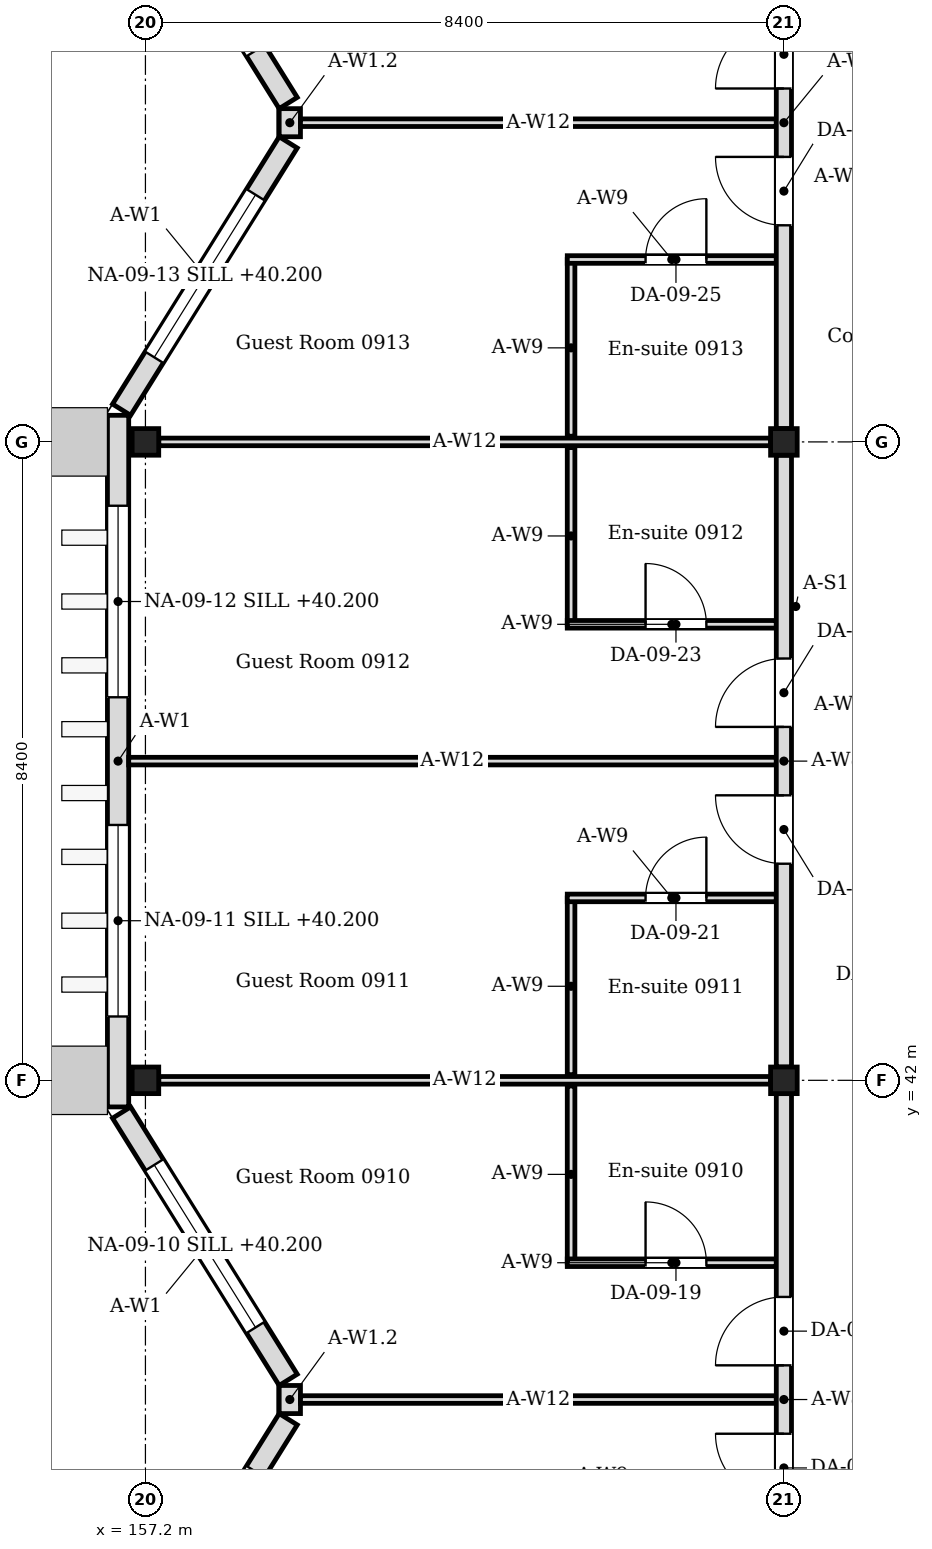
"""IFC4 building model, lengths in metres.
Left out: names, types, materials, properties, quantities, classifications, styles, units other than length and angle.
Written with IfcOpenShell. Run it as: python <this file> out.ifc"""

import sys

from ifc_helpers import new_model, si_unit, direction, frame, frame_2d, origin, origin_2d, place, context, subcontext, project, spatial, rectangle, i_section, extrude, element, fill, save


model = new_model("IFC4")
c1 = context("Model", 3, precision=1e-05, world=origin(), true_north=direction((0.0, 1.0)))
c2 = subcontext(c1, "Body", "Model", "MODEL_VIEW")
j1 = project(units=[si_unit("LENGTHUNIT", "METRE"), si_unit("PLANEANGLEUNIT", "RADIAN")], contexts=[c1])
p1 = place(None, origin())
s1 = spatial("IfcSite", under=j1, at=p1, CompositionType="ELEMENT")
p2 = place(p1, origin())
s2 = spatial("IfcBuilding", under=s1, at=p2, CompositionType="ELEMENT")
p3 = place(p2, frame((0.0, 0.0, 39.6)))
s3 = spatial("IfcBuildingStorey", under=s2, at=p3, CompositionType="ELEMENT", Elevation=39.6)
for number, where, z_axis, x_axis in (
    (1, (157.2, 42.0, 0.0), (0.0, 0.0, 1.0), (1.0, 0.0, 0.0)),
    (2, (157.2, 50.4, 0.0), (0.0, 0.0, 1.0), (1.0, 0.0, 0.0)),
    (3, (165.6, 42.0, 0.0), (0.0, 0.0, 1.0), (1.0, 0.0, 0.0)),
    (4, (165.6, 50.4, 0.0), (0.0, 0.0, 1.0), (1.0, 0.0, 0.0)),
):
    element("IfcColumn", number, at=place(p3, frame(where, z_axis=z_axis, x_axis=x_axis)), inside=s3, PredefinedType="COLUMN", context=c2, shape_type="SweptSolid", body=[
        extrude(i_section(OverallWidth=0.35, OverallDepth=0.35, WebThickness=0.012, FlangeThickness=0.019, FilletRadius=0.013, at=origin_2d()), origin(), (0.0, 0.0, 1.0), 4.2),
    ])
p4 = place(p3, frame((156.886, 34.024, 0.0), z_axis=(0.0, 0.0, 1.0), x_axis=(0.529018946142, 0.848610013271, 0.0)))
e5 = element("IfcWall", 5, at=p4, inside=s3, PredefinedType="SOLIDWALL", context=c2, shape_type="SweptSolid", body=[
    extrude(rectangle(XDim=4.144, YDim=0.28, at=frame_2d((2.072, 0.0))), origin(), (0.0, 0.0, 1.0), 4.05),
])
p5 = place(p4, frame((0.812, 0.0, 0.6)))
e6 = element("IfcOpeningElement", 6, at=p5, cuts=e5, PredefinedType="OPENING", context=c2, shape_type="SweptSolid", body=[
    extrude(rectangle(XDim=2.52, YDim=2.4, at=frame_2d((1.26, 1.2))), frame((0.0, 0.15, 0.0), z_axis=(0.0, -1.0, 0.0), x_axis=(1.0, 0.0, 0.0)), (0.0, 0.0, 1.0), 0.3),
])
p6 = place(p3, frame((159.079, 38.059, 0.0), z_axis=(0.0, 0.0, 1.0), x_axis=(-0.529018946142, 0.848610013271, 0.0)))
e7 = element("IfcWall", 7, at=p6, inside=s3, PredefinedType="SOLIDWALL", context=c2, shape_type="SweptSolid", body=[
    extrude(rectangle(XDim=4.144, YDim=0.28, at=frame_2d((2.072, 0.0))), origin(), (0.0, 0.0, 1.0), 4.05),
])
p7 = place(p6, frame((0.812, 0.0, 0.6)))
e8 = element("IfcOpeningElement", 8, at=p7, cuts=e7, PredefinedType="OPENING", context=c2, shape_type="SweptSolid", body=[
    extrude(rectangle(XDim=2.52, YDim=2.4, at=frame_2d((1.26, 1.2))), frame((0.0, 0.15, 0.0), z_axis=(0.0, -1.0, 0.0), x_axis=(1.0, 0.0, 0.0)), (0.0, 0.0, 1.0), 0.3),
])
p8 = place(p3, frame((159.1, 37.615, 0.0), z_axis=(0.0, 0.0, 1.0), x_axis=(0.0, 1.0, 0.0)))
e9 = element("IfcWall", 9, at=p8, inside=s3, PredefinedType="SOLIDWALL", context=c2, shape_type="SweptSolid", body=[
    extrude(rectangle(XDim=0.37, YDim=0.28, at=frame_2d((0.185, 0.0))), origin(), (0.0, 0.0, 1.0), 3.604),
])
p9 = place(p3, frame((156.84, 41.65, 0.0), z_axis=(0.0, 0.0, 1.0), x_axis=(0.0, 1.0, 0.0)))
e10 = element("IfcWall", 10, at=p9, inside=s3, PredefinedType="SOLIDWALL", context=c2, shape_type="SweptSolid", body=[
    extrude(rectangle(XDim=9.1, YDim=0.28, at=frame_2d((4.55, 0.0))), origin(), (0.0, 0.0, 1.0), 4.05),
])
p10 = place(p9, frame((1.19, 0.0, 0.6)))
e11 = element("IfcOpeningElement", 11, at=p10, cuts=e10, PredefinedType="OPENING", context=c2, shape_type="SweptSolid", body=[
    extrude(rectangle(XDim=2.52, YDim=2.4, at=frame_2d((1.26, 1.2))), frame((0.0, 0.15, 0.0), z_axis=(0.0, -1.0, 0.0), x_axis=(1.0, 0.0, 0.0)), (0.0, 0.0, 1.0), 0.3),
])
p11 = place(p9, frame((5.39, 0.0, 0.6)))
e12 = element("IfcOpeningElement", 12, at=p11, cuts=e10, PredefinedType="OPENING", context=c2, shape_type="SweptSolid", body=[
    extrude(rectangle(XDim=2.52, YDim=2.4, at=frame_2d((1.26, 1.2))), frame((0.0, 0.15, 0.0), z_axis=(0.0, -1.0, 0.0), x_axis=(1.0, 0.0, 0.0)), (0.0, 0.0, 1.0), 0.3),
])
p12 = place(p3, frame((156.886, 50.824, 0.0), z_axis=(0.0, 0.0, 1.0), x_axis=(0.529018946142, 0.848610013271, 0.0)))
e13 = element("IfcWall", 13, at=p12, inside=s3, PredefinedType="SOLIDWALL", context=c2, shape_type="SweptSolid", body=[
    extrude(rectangle(XDim=4.144, YDim=0.28, at=frame_2d((2.072, 0.0))), origin(), (0.0, 0.0, 1.0), 4.05),
])
p13 = place(p12, frame((0.812, 0.0, 0.6)))
e14 = element("IfcOpeningElement", 14, at=p13, cuts=e13, PredefinedType="OPENING", context=c2, shape_type="SweptSolid", body=[
    extrude(rectangle(XDim=2.52, YDim=2.4, at=frame_2d((1.26, 1.2))), frame((0.0, 0.15, 0.0), z_axis=(0.0, -1.0, 0.0), x_axis=(1.0, 0.0, 0.0)), (0.0, 0.0, 1.0), 0.3),
])
p14 = place(p3, frame((159.079, 54.859, 0.0), z_axis=(0.0, 0.0, 1.0), x_axis=(-0.528992500338, 0.848626498871, 0.0)))
e15 = element("IfcWall", 15, at=p14, inside=s3, PredefinedType="SOLIDWALL", context=c2, shape_type="SweptSolid", body=[
    extrude(rectangle(XDim=4.145, YDim=0.28, at=frame_2d((2.072, 0.0))), origin(), (0.0, 0.0, 1.0), 4.05),
])
p15 = place(p14, frame((0.812, 0.0, 0.6)))
e16 = element("IfcOpeningElement", 16, at=p15, cuts=e15, PredefinedType="OPENING", context=c2, shape_type="SweptSolid", body=[
    extrude(rectangle(XDim=2.52, YDim=2.4, at=frame_2d((1.26, 1.2))), frame((0.0, 0.15, 0.0), z_axis=(0.0, -1.0, 0.0), x_axis=(1.0, 0.0, 0.0)), (0.0, 0.0, 1.0), 0.3),
])
p16 = place(p3, frame((159.1, 54.415, 0.0), z_axis=(0.0, 0.0, 1.0), x_axis=(0.0, 1.0, 0.0)))
e17 = element("IfcWall", 17, at=p16, inside=s3, PredefinedType="SOLIDWALL", context=c2, shape_type="SweptSolid", body=[
    extrude(rectangle(XDim=0.37, YDim=0.28, at=frame_2d((0.185, 0.0))), origin(), (0.0, 0.0, 1.0), 3.604),
])
p17 = place(p3, frame((162.8, 39.6, 0.0), z_axis=(0.0, 0.0, 1.0), x_axis=(0.0, 1.0, 0.0)))
e18 = element("IfcWall", 18, at=p17, inside=s3, PredefinedType="PARTITIONING", context=c2, shape_type="SweptSolid", body=[
    extrude(rectangle(XDim=2.325, YDim=0.1, at=frame_2d((1.163, 0.0))), origin(), (0.0, 0.0, 1.0), 4.05),
])
p18 = place(p3, frame((162.75, 39.6, 0.0), z_axis=(0.0, 0.0, 1.0), x_axis=(1.0, 0.0, 0.0)))
e19 = element("IfcWall", 19, at=p18, inside=s3, PredefinedType="PARTITIONING", context=c2, shape_type="SweptSolid", body=[
    extrude(rectangle(XDim=2.75, YDim=0.1, at=frame_2d((1.375, 0.0))), origin(), (0.0, 0.0, 1.0), 4.05),
])
p19 = place(p18, frame((1.03, 0.0, 0.0)))
e20 = element("IfcOpeningElement", 20, at=p19, cuts=e19, PredefinedType="OPENING", context=c2, shape_type="SweptSolid", body=[
    extrude(rectangle(XDim=0.8, YDim=2.1, at=frame_2d((0.4, 1.05))), frame((0.0, 0.06, 0.0), z_axis=(0.0, -1.0, 0.0), x_axis=(1.0, 0.0, 0.0)), (0.0, 0.0, 1.0), 0.12),
])
p20 = place(p3, frame((162.8, 42.075, 0.0), z_axis=(0.0, 0.0, 1.0), x_axis=(0.0, 1.0, 0.0)))
e21 = element("IfcWall", 21, at=p20, inside=s3, PredefinedType="PARTITIONING", context=c2, shape_type="SweptSolid", body=[
    extrude(rectangle(XDim=2.325, YDim=0.1, at=frame_2d((1.163, 0.0))), origin(), (0.0, 0.0, 1.0), 4.05),
])
p21 = place(p3, frame((162.75, 44.4, 0.0), z_axis=(0.0, 0.0, 1.0), x_axis=(1.0, 0.0, 0.0)))
e22 = element("IfcWall", 22, at=p21, inside=s3, PredefinedType="PARTITIONING", context=c2, shape_type="SweptSolid", body=[
    extrude(rectangle(XDim=2.75, YDim=0.1, at=frame_2d((1.375, 0.0))), origin(), (0.0, 0.0, 1.0), 4.05),
])
p22 = place(p21, frame((1.03, 0.0, 0.0)))
e23 = element("IfcOpeningElement", 23, at=p22, cuts=e22, PredefinedType="OPENING", context=c2, shape_type="SweptSolid", body=[
    extrude(rectangle(XDim=0.8, YDim=2.1, at=frame_2d((0.4, 1.05))), frame((0.0, 0.06, 0.0), z_axis=(0.0, -1.0, 0.0), x_axis=(1.0, 0.0, 0.0)), (0.0, 0.0, 1.0), 0.12),
])
p23 = place(p3, frame((162.8, 48.0, 0.0), z_axis=(0.0, 0.0, 1.0), x_axis=(0.0, 1.0, 0.0)))
e24 = element("IfcWall", 24, at=p23, inside=s3, PredefinedType="PARTITIONING", context=c2, shape_type="SweptSolid", body=[
    extrude(rectangle(XDim=2.325, YDim=0.1, at=frame_2d((1.163, 0.0))), origin(), (0.0, 0.0, 1.0), 4.05),
])
p24 = place(p3, frame((162.75, 48.0, 0.0), z_axis=(0.0, 0.0, 1.0), x_axis=(1.0, 0.0, 0.0)))
e25 = element("IfcWall", 25, at=p24, inside=s3, PredefinedType="PARTITIONING", context=c2, shape_type="SweptSolid", body=[
    extrude(rectangle(XDim=2.75, YDim=0.1, at=frame_2d((1.375, 0.0))), origin(), (0.0, 0.0, 1.0), 4.05),
])
p25 = place(p24, frame((1.03, 0.0, 0.0)))
e26 = element("IfcOpeningElement", 26, at=p25, cuts=e25, PredefinedType="OPENING", context=c2, shape_type="SweptSolid", body=[
    extrude(rectangle(XDim=0.8, YDim=2.1, at=frame_2d((0.4, 1.05))), frame((0.0, 0.06, 0.0), z_axis=(0.0, -1.0, 0.0), x_axis=(1.0, 0.0, 0.0)), (0.0, 0.0, 1.0), 0.12),
])
p26 = place(p3, frame((162.8, 50.475, 0.0), z_axis=(0.0, 0.0, 1.0), x_axis=(0.0, 1.0, 0.0)))
e27 = element("IfcWall", 27, at=p26, inside=s3, PredefinedType="PARTITIONING", context=c2, shape_type="SweptSolid", body=[
    extrude(rectangle(XDim=2.325, YDim=0.1, at=frame_2d((1.163, 0.0))), origin(), (0.0, 0.0, 1.0), 4.05),
])
p27 = place(p3, frame((162.75, 52.8, 0.0), z_axis=(0.0, 0.0, 1.0), x_axis=(1.0, 0.0, 0.0)))
e28 = element("IfcWall", 28, at=p27, inside=s3, PredefinedType="PARTITIONING", context=c2, shape_type="SweptSolid", body=[
    extrude(rectangle(XDim=2.75, YDim=0.1, at=frame_2d((1.375, 0.0))), origin(), (0.0, 0.0, 1.0), 4.05),
])
p28 = place(p27, frame((1.03, 0.0, 0.0)))
e29 = element("IfcOpeningElement", 29, at=p28, cuts=e28, PredefinedType="OPENING", context=c2, shape_type="SweptSolid", body=[
    extrude(rectangle(XDim=0.8, YDim=2.1, at=frame_2d((0.4, 1.05))), frame((0.0, 0.06, 0.0), z_axis=(0.0, -1.0, 0.0), x_axis=(1.0, 0.0, 0.0)), (0.0, 0.0, 1.0), 0.12),
])
for number, where, z_axis, x_axis in (
    (30, (157.375, 42.0, 0.0), (0.0, 0.0, 1.0), (1.0, 0.0, 0.0)),
    (31, (157.375, 50.4, 0.0), (0.0, 0.0, 1.0), (1.0, 0.0, 0.0)),
):
    element("IfcWall", number, at=place(p3, frame(where, z_axis=z_axis, x_axis=x_axis)), inside=s3, PredefinedType="PARTITIONING", context=c2, shape_type="SweptSolid", body=[
        extrude(rectangle(XDim=8.05, YDim=0.1, at=frame_2d((4.025, 0.0))), origin(), (0.0, 0.0, 1.0), 3.604),
    ])
p29 = place(p3, frame((159.24, 37.8, 0.0), z_axis=(0.0, 0.0, 1.0), x_axis=(1.0, 0.0, 0.0)))
e32 = element("IfcWall", 32, at=p29, inside=s3, PredefinedType="PARTITIONING", context=c2, shape_type="SweptSolid", body=[
    extrude(rectangle(XDim=6.26, YDim=0.1, at=frame_2d((3.13, 0.0))), origin(), (0.0, 0.0, 1.0), 3.604),
])
p30 = place(p3, frame((156.98, 46.2, 0.0), z_axis=(0.0, 0.0, 1.0), x_axis=(1.0, 0.0, 0.0)))
e33 = element("IfcWall", 33, at=p30, inside=s3, PredefinedType="PARTITIONING", context=c2, shape_type="SweptSolid", body=[
    extrude(rectangle(XDim=8.52, YDim=0.1, at=frame_2d((4.26, 0.0))), origin(), (0.0, 0.0, 1.0), 3.604),
])
p31 = place(p3, frame((159.24, 54.6, 0.0), z_axis=(0.0, 0.0, 1.0), x_axis=(1.0, 0.0, 0.0)))
e34 = element("IfcWall", 34, at=p31, inside=s3, PredefinedType="PARTITIONING", context=c2, shape_type="SweptSolid", body=[
    extrude(rectangle(XDim=6.26, YDim=0.1, at=frame_2d((3.13, 0.0))), origin(), (0.0, 0.0, 1.0), 3.604),
])
p32 = place(p3, frame((165.6, 33.775, 0.0), z_axis=(0.0, 0.0, 1.0), x_axis=(0.0, 1.0, 0.0)))
e35 = element("IfcWall", 35, at=p32, inside=s3, PredefinedType="PARTITIONING", context=c2, shape_type="SweptSolid", body=[
    extrude(rectangle(XDim=8.05, YDim=0.2, at=frame_2d((4.025, 0.0))), origin(), (0.0, 0.0, 1.0), 3.45),
])
p33 = place(p32, frame((2.675, 0.0, 0.0)))
e36 = element("IfcOpeningElement", 36, at=p33, cuts=e35, PredefinedType="OPENING", context=c2, shape_type="SweptSolid", body=[
    extrude(rectangle(XDim=0.9, YDim=2.1, at=frame_2d((0.45, 1.05))), frame((0.0, 0.11, 0.0), z_axis=(0.0, -1.0, 0.0), x_axis=(1.0, 0.0, 0.0)), (0.0, 0.0, 1.0), 0.22),
])
p34 = place(p32, frame((4.475, 0.0, 0.0)))
e37 = element("IfcOpeningElement", 37, at=p34, cuts=e35, PredefinedType="OPENING", context=c2, shape_type="SweptSolid", body=[
    extrude(rectangle(XDim=0.9, YDim=2.1, at=frame_2d((0.45, 1.05))), frame((0.0, 0.11, 0.0), z_axis=(0.0, -1.0, 0.0), x_axis=(1.0, 0.0, 0.0)), (0.0, 0.0, 1.0), 0.22),
])
p35 = place(p3, frame((165.6, 42.175, 0.0), z_axis=(0.0, 0.0, 1.0), x_axis=(0.0, 1.0, 0.0)))
e38 = element("IfcWall", 38, at=p35, inside=s3, PredefinedType="PARTITIONING", context=c2, shape_type="SweptSolid", body=[
    extrude(rectangle(XDim=8.05, YDim=0.2, at=frame_2d((4.025, 0.0))), origin(), (0.0, 0.0, 1.0), 3.45),
])
p36 = place(p35, frame((2.675, 0.0, 0.0)))
e39 = element("IfcOpeningElement", 39, at=p36, cuts=e38, PredefinedType="OPENING", context=c2, shape_type="SweptSolid", body=[
    extrude(rectangle(XDim=0.9, YDim=2.1, at=frame_2d((0.45, 1.05))), frame((0.0, 0.11, 0.0), z_axis=(0.0, -1.0, 0.0), x_axis=(1.0, 0.0, 0.0)), (0.0, 0.0, 1.0), 0.22),
])
p37 = place(p35, frame((4.475, 0.0, 0.0)))
e40 = element("IfcOpeningElement", 40, at=p37, cuts=e38, PredefinedType="OPENING", context=c2, shape_type="SweptSolid", body=[
    extrude(rectangle(XDim=0.9, YDim=2.1, at=frame_2d((0.45, 1.05))), frame((0.0, 0.11, 0.0), z_axis=(0.0, -1.0, 0.0), x_axis=(1.0, 0.0, 0.0)), (0.0, 0.0, 1.0), 0.22),
])
p38 = place(p3, frame((165.6, 50.575, 0.0), z_axis=(0.0, 0.0, 1.0), x_axis=(0.0, 1.0, 0.0)))
e41 = element("IfcWall", 41, at=p38, inside=s3, PredefinedType="PARTITIONING", context=c2, shape_type="SweptSolid", body=[
    extrude(rectangle(XDim=8.05, YDim=0.2, at=frame_2d((4.025, 0.0))), origin(), (0.0, 0.0, 1.0), 3.45),
])
p39 = place(p38, frame((2.675, 0.0, 0.0)))
e42 = element("IfcOpeningElement", 42, at=p39, cuts=e41, PredefinedType="OPENING", context=c2, shape_type="SweptSolid", body=[
    extrude(rectangle(XDim=0.9, YDim=2.1, at=frame_2d((0.45, 1.05))), frame((0.0, 0.11, 0.0), z_axis=(0.0, -1.0, 0.0), x_axis=(1.0, 0.0, 0.0)), (0.0, 0.0, 1.0), 0.22),
])
p40 = place(p38, frame((4.475, 0.0, 0.0)))
e43 = element("IfcOpeningElement", 43, at=p40, cuts=e41, PredefinedType="OPENING", context=c2, shape_type="SweptSolid", body=[
    extrude(rectangle(XDim=0.9, YDim=2.1, at=frame_2d((0.45, 1.05))), frame((0.0, 0.11, 0.0), z_axis=(0.0, -1.0, 0.0), x_axis=(1.0, 0.0, 0.0)), (0.0, 0.0, 1.0), 0.22),
])
p41 = place(p7, origin())
e44 = element("IfcWindow", 44, at=p41, inside=s3, PartitioningType="SINGLE_PANEL", PredefinedType="WINDOW", context=c2, shape_type="SweptSolid", body=[
    extrude(rectangle(XDim=2.52, YDim=2.4, at=frame_2d((1.26, 1.2))), frame((0.0, 0.03, 0.0), z_axis=(0.0, -1.0, 0.0), x_axis=(1.0, 0.0, 0.0)), (0.0, 0.0, 1.0), 0.06),
])
fill(e8, e44)
p42 = place(p10, origin())
e45 = element("IfcWindow", 45, at=p42, inside=s3, PartitioningType="SINGLE_PANEL", PredefinedType="WINDOW", context=c2, shape_type="SweptSolid", body=[
    extrude(rectangle(XDim=2.52, YDim=2.4, at=frame_2d((1.26, 1.2))), frame((0.0, 0.03, 0.0), z_axis=(0.0, -1.0, 0.0), x_axis=(1.0, 0.0, 0.0)), (0.0, 0.0, 1.0), 0.06),
])
fill(e11, e45)
p43 = place(p11, origin())
e46 = element("IfcWindow", 46, at=p43, inside=s3, PartitioningType="SINGLE_PANEL", PredefinedType="WINDOW", context=c2, shape_type="SweptSolid", body=[
    extrude(rectangle(XDim=2.52, YDim=2.4, at=frame_2d((1.26, 1.2))), frame((0.0, 0.03, 0.0), z_axis=(0.0, -1.0, 0.0), x_axis=(1.0, 0.0, 0.0)), (0.0, 0.0, 1.0), 0.06),
])
fill(e12, e46)
p44 = place(p13, origin())
e47 = element("IfcWindow", 47, at=p44, inside=s3, PartitioningType="SINGLE_PANEL", PredefinedType="WINDOW", context=c2, shape_type="SweptSolid", body=[
    extrude(rectangle(XDim=2.52, YDim=2.4, at=frame_2d((1.26, 1.2))), frame((0.0, 0.03, 0.0), z_axis=(0.0, -1.0, 0.0), x_axis=(1.0, 0.0, 0.0)), (0.0, 0.0, 1.0), 0.06),
])
fill(e14, e47)
p45 = place(p33, origin())
e48 = element("IfcDoor", 48, at=p45, inside=s3, OperationType="SINGLE_SWING_RIGHT", PredefinedType="DOOR", context=c2, shape_type="SweptSolid", body=[
    extrude(rectangle(XDim=0.9, YDim=2.1, at=frame_2d((0.45, 1.05))), frame((0.0, 0.025, 0.0), z_axis=(0.0, -1.0, 0.0), x_axis=(1.0, 0.0, 0.0)), (0.0, 0.0, 1.0), 0.05),
])
fill(e36, e48)
p46 = place(p19, origin())
e49 = element("IfcDoor", 49, at=p46, inside=s3, OperationType="SINGLE_SWING_LEFT", PredefinedType="DOOR", context=c2, shape_type="SweptSolid", body=[
    extrude(rectangle(XDim=0.8, YDim=2.1, at=frame_2d((0.4, 1.05))), frame((0.0, 0.025, 0.0), z_axis=(0.0, -1.0, 0.0), x_axis=(1.0, 0.0, 0.0)), (0.0, 0.0, 1.0), 0.05),
])
fill(e20, e49)
p47 = place(p34, origin())
e50 = element("IfcDoor", 50, at=p47, inside=s3, OperationType="SINGLE_SWING_LEFT", PredefinedType="DOOR", context=c2, shape_type="SweptSolid", body=[
    extrude(rectangle(XDim=0.9, YDim=2.1, at=frame_2d((0.45, 1.05))), frame((0.0, 0.025, 0.0), z_axis=(0.0, -1.0, 0.0), x_axis=(1.0, 0.0, 0.0)), (0.0, 0.0, 1.0), 0.05),
])
fill(e37, e50)
p48 = place(p22, origin())
e51 = element("IfcDoor", 51, at=p48, inside=s3, OperationType="SINGLE_SWING_RIGHT", PredefinedType="DOOR", context=c2, shape_type="SweptSolid", body=[
    extrude(rectangle(XDim=0.8, YDim=2.1, at=frame_2d((0.4, 1.05))), frame((0.0, 0.025, 0.0), z_axis=(0.0, -1.0, 0.0), x_axis=(1.0, 0.0, 0.0)), (0.0, 0.0, 1.0), 0.05),
])
fill(e23, e51)
p49 = place(p36, origin())
e52 = element("IfcDoor", 52, at=p49, inside=s3, OperationType="SINGLE_SWING_RIGHT", PredefinedType="DOOR", context=c2, shape_type="SweptSolid", body=[
    extrude(rectangle(XDim=0.9, YDim=2.1, at=frame_2d((0.45, 1.05))), frame((0.0, 0.025, 0.0), z_axis=(0.0, -1.0, 0.0), x_axis=(1.0, 0.0, 0.0)), (0.0, 0.0, 1.0), 0.05),
])
fill(e39, e52)
p50 = place(p25, origin())
e53 = element("IfcDoor", 53, at=p50, inside=s3, OperationType="SINGLE_SWING_LEFT", PredefinedType="DOOR", context=c2, shape_type="SweptSolid", body=[
    extrude(rectangle(XDim=0.8, YDim=2.1, at=frame_2d((0.4, 1.05))), frame((0.0, 0.025, 0.0), z_axis=(0.0, -1.0, 0.0), x_axis=(1.0, 0.0, 0.0)), (0.0, 0.0, 1.0), 0.05),
])
fill(e26, e53)
p51 = place(p37, origin())
e54 = element("IfcDoor", 54, at=p51, inside=s3, OperationType="SINGLE_SWING_LEFT", PredefinedType="DOOR", context=c2, shape_type="SweptSolid", body=[
    extrude(rectangle(XDim=0.9, YDim=2.1, at=frame_2d((0.45, 1.05))), frame((0.0, 0.025, 0.0), z_axis=(0.0, -1.0, 0.0), x_axis=(1.0, 0.0, 0.0)), (0.0, 0.0, 1.0), 0.05),
])
fill(e40, e54)
p52 = place(p28, origin())
e55 = element("IfcDoor", 55, at=p52, inside=s3, OperationType="SINGLE_SWING_RIGHT", PredefinedType="DOOR", context=c2, shape_type="SweptSolid", body=[
    extrude(rectangle(XDim=0.8, YDim=2.1, at=frame_2d((0.4, 1.05))), frame((0.0, 0.025, 0.0), z_axis=(0.0, -1.0, 0.0), x_axis=(1.0, 0.0, 0.0)), (0.0, 0.0, 1.0), 0.05),
])
fill(e29, e55)
p53 = place(p39, origin())
e56 = element("IfcDoor", 56, at=p53, inside=s3, OperationType="SINGLE_SWING_RIGHT", PredefinedType="DOOR", context=c2, shape_type="SweptSolid", body=[
    extrude(rectangle(XDim=0.9, YDim=2.1, at=frame_2d((0.45, 1.05))), frame((0.0, 0.025, 0.0), z_axis=(0.0, -1.0, 0.0), x_axis=(1.0, 0.0, 0.0)), (0.0, 0.0, 1.0), 0.05),
])
fill(e42, e56)
p54 = place(p40, origin())
e57 = element("IfcDoor", 57, at=p54, inside=s3, OperationType="SINGLE_SWING_LEFT", PredefinedType="DOOR", context=c2, shape_type="SweptSolid", body=[
    extrude(rectangle(XDim=0.9, YDim=2.1, at=frame_2d((0.45, 1.05))), frame((0.0, 0.025, 0.0), z_axis=(0.0, -1.0, 0.0), x_axis=(1.0, 0.0, 0.0)), (0.0, 0.0, 1.0), 0.05),
])
fill(e43, e57)
save(model, sys.argv[1])
